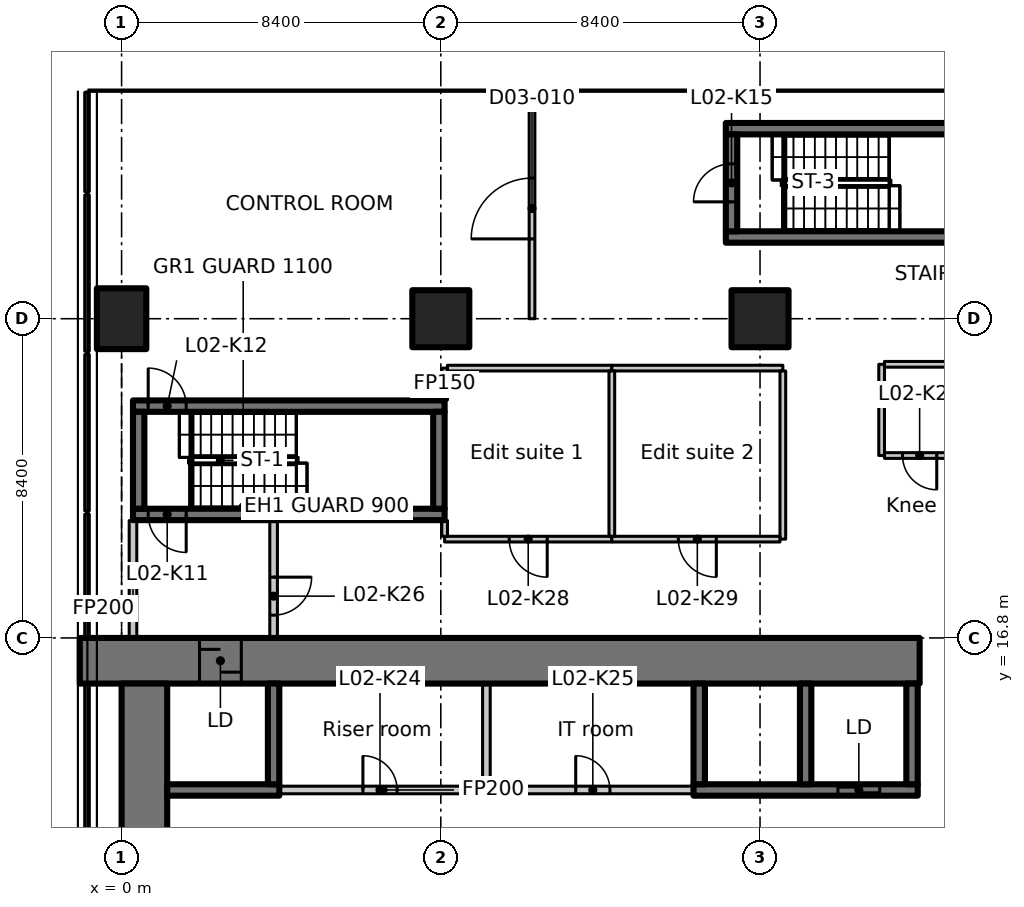
"""IFC4 building model, lengths in metres.
Left out: names, types, materials, properties, quantities, classifications, styles, units other than length and angle.
Written with IfcOpenShell. Run it as: python <this file> out.ifc"""

import sys

from ifc_helpers import new_model, si_unit, direction, frame, frame_2d, origin, origin_2d, place, context, subcontext, project, spatial, polyline, rectangle, outline, extrude, element, fill, save


model = new_model("IFC4")
c1 = context("Model", 3, precision=1e-05, world=origin(), true_north=direction((0.0, 1.0)))
c2 = subcontext(c1, "Body", "Model", "MODEL_VIEW")
j1 = project(units=[si_unit("LENGTHUNIT", "METRE"), si_unit("PLANEANGLEUNIT", "RADIAN")], contexts=[c1])
p1 = place(None, origin())
s1 = spatial("IfcSite", under=j1, at=p1, CompositionType="ELEMENT")
p2 = place(p1, origin())
s2 = spatial("IfcBuilding", under=s1, at=p2, CompositionType="ELEMENT")
p3 = place(p2, frame((0.0, 0.0, 12.5)))
s3 = spatial("IfcBuildingStorey", under=s2, at=p3, CompositionType="ELEMENT", Elevation=12.5)
p4 = place(p3, frame((0.0, 25.2, 0.0), z_axis=(0.0, 0.0, 1.0), x_axis=(1.0, 0.0, 0.0)))
e1 = element("IfcColumn", 1, at=p4, inside=s3, PredefinedType="COLUMN", context=c2, shape_type="SweptSolid", body=[
    extrude(rectangle(XDim=1.3, YDim=1.6, at=origin_2d()), origin(), (0.0, 0.0, 1.0), 7.25),
])
for number, where, z_axis, x_axis in (
    (2, (8.4, 25.2, 0.0), (0.0, 0.0, 1.0), (1.0, 0.0, 0.0)),
    (3, (16.8, 25.2, 0.0), (0.0, 0.0, 1.0), (1.0, 0.0, 0.0)),
):
    element("IfcColumn", number, at=place(p3, frame(where, z_axis=z_axis, x_axis=x_axis)), inside=s3, PredefinedType="COLUMN", context=c2, shape_type="SweptSolid", body=[
        extrude(rectangle(XDim=1.5, YDim=1.5, at=origin_2d()), origin(), (0.0, 0.0, 1.0), 7.25),
    ])
p5 = place(p2, origin())
s4 = spatial("IfcBuildingStorey", under=s2, at=p5, CompositionType="ELEMENT", Elevation=0.0)
for number, where, z_axis, x_axis in (
    (4, (0.6, 32.4, -6.3), (0.0, 0.0, 1.0), (1.0, 0.0, 0.0)),
    (5, (9.0, 32.4, -6.3), (0.0, 0.0, 1.0), (1.0, 0.0, 0.0)),
):
    element("IfcWall", number, at=place(p5, frame(where, z_axis=z_axis, x_axis=x_axis)), inside=s4, PredefinedType="SOLIDWALL", context=c2, shape_type="SweptSolid", body=[
        extrude(rectangle(XDim=7.2, YDim=2.4, at=frame_2d((3.6, 0.0))), origin(), (0.0, 0.0, 1.0), 42.55),
    ])
p6 = place(p5, frame((17.4, 32.4, -6.3), z_axis=(0.0, 0.0, 1.0), x_axis=(1.0, 0.0, 0.0)))
e6 = element("IfcWall", 6, at=p6, inside=s4, PredefinedType="SOLIDWALL", context=c2, shape_type="SweptSolid", body=[
    extrude(rectangle(XDim=7.2, YDim=2.4, at=frame_2d((3.6, 0.0))), origin(), (0.0, 0.0, 1.0), 42.55),
])
p7 = place(p3, origin())
e7 = element("IfcWall", 7, at=p7, inside=s3, PredefinedType="SOLIDWALL", context=c2, shape_type="SweptSolid", body=[
    extrude(outline(polyline([(-0.97, 28.545), (-0.85, 28.545), (-0.85, 31.155), (-0.97, 31.155), (-0.97, 28.545)])), origin(), (0.0, 0.0, 1.0), 7.5),
])
p8 = place(p3, origin())
e8 = element("IfcWall", 8, at=p8, inside=s3, PredefinedType="SOLIDWALL", context=c2, shape_type="SweptSolid", body=[
    extrude(outline(polyline([(-0.97, 24.345), (-0.85, 24.345), (-0.85, 28.455), (-0.97, 28.455), (-0.97, 24.345)])), origin(), (0.0, 0.0, 1.0), 7.5),
])
p9 = place(p3, origin())
e9 = element("IfcWall", 9, at=p9, inside=s3, PredefinedType="SOLIDWALL", context=c2, shape_type="SweptSolid", body=[
    extrude(outline(polyline([(-0.97, 20.145), (-0.85, 20.145), (-0.85, 24.255), (-0.97, 24.255), (-0.97, 20.145)])), origin(), (0.0, 0.0, 1.0), 7.5),
])
p10 = place(p3, origin())
e10 = element("IfcWall", 10, at=p10, inside=s3, PredefinedType="SOLIDWALL", context=c2, shape_type="SweptSolid", body=[
    extrude(outline(polyline([(-0.97, 15.945), (-0.85, 15.945), (-0.85, 20.055), (-0.97, 20.055), (-0.97, 15.945)])), origin(), (0.0, 0.0, 1.0), 7.5),
])
p11 = place(p3, origin())
e11 = element("IfcWall", 11, at=p11, inside=s3, PredefinedType="SOLIDWALL", context=c2, shape_type="SweptSolid", body=[
    extrude(outline(polyline([(-0.97, 11.745), (-0.85, 11.745), (-0.85, 15.855), (-0.97, 15.855), (-0.97, 11.745)])), origin(), (0.0, 0.0, 1.0), 7.5),
])
p12 = place(p3, frame((-1.1, 16.2, 0.0), z_axis=(0.0, 0.0, 1.0), x_axis=(1.0, 0.0, 0.0)))
e12 = element("IfcWall", 12, at=p12, inside=s3, PredefinedType="SHEAR", context=c2, shape_type="SweptSolid", body=[
    extrude(rectangle(XDim=22.1, YDim=1.2, at=frame_2d((11.05, 0.0))), origin(), (0.0, 0.0, 1.0), 7.25),
])
p13 = place(p12, frame((3.15, 0.0, 0.0)))
e13 = element("IfcOpeningElement", 13, at=p13, cuts=e12, PredefinedType="OPENING", context=c2, shape_type="SweptSolid", body=[
    extrude(rectangle(XDim=1.1, YDim=2.3, at=frame_2d((0.55, 1.15))), frame((0.0, 0.61, 0.0), z_axis=(0.0, -1.0, 0.0), x_axis=(1.0, 0.0, 0.0)), (0.0, 0.0, 1.0), 1.22),
])
p14 = place(p3, frame((0.6, 6.736, 0.0), z_axis=(0.0, 0.0, 1.0), x_axis=(0.0, 1.0, 0.0)))
e14 = element("IfcWall", 14, at=p14, inside=s3, PredefinedType="SHEAR", context=c2, shape_type="SweptSolid", body=[
    extrude(rectangle(XDim=8.864, YDim=1.2, at=frame_2d((4.432, 0.0))), origin(), (0.0, 0.0, 1.0), 7.25),
])
p15 = place(p3, frame((1.2, 12.8, 0.0), z_axis=(0.0, 0.0, 1.0), x_axis=(1.0, 0.0, 0.0)))
e15 = element("IfcWall", 15, at=p15, inside=s3, PredefinedType="SHEAR", context=c2, shape_type="SweptSolid", body=[
    extrude(rectangle(XDim=2.95, YDim=0.3, at=frame_2d((1.475, 0.0))), origin(), (0.0, 0.0, 1.0), 7.25),
])
p16 = place(p3, frame((4.0, 12.95, 0.0), z_axis=(0.0, 0.0, 1.0), x_axis=(0.0, 1.0, 0.0)))
e16 = element("IfcWall", 16, at=p16, inside=s3, PredefinedType="SHEAR", context=c2, shape_type="SweptSolid", body=[
    extrude(rectangle(XDim=2.65, YDim=0.3, at=frame_2d((1.325, 0.0))), origin(), (0.0, 0.0, 1.0), 7.25),
])
p17 = place(p3, frame((15.05, 12.8, 0.0), z_axis=(0.0, 0.0, 1.0), x_axis=(1.0, 0.0, 0.0)))
e17 = element("IfcWall", 17, at=p17, inside=s3, PredefinedType="SHEAR", context=c2, shape_type="SweptSolid", body=[
    extrude(rectangle(XDim=5.9, YDim=0.3, at=frame_2d((2.95, 0.0))), origin(), (0.0, 0.0, 1.0), 7.25),
])
p18 = place(p17, frame((3.8, 0.0, 0.0)))
e18 = element("IfcOpeningElement", 18, at=p18, cuts=e17, PredefinedType="OPENING", context=c2, shape_type="SweptSolid", body=[
    extrude(rectangle(XDim=1.1, YDim=2.3, at=frame_2d((0.55, 1.15))), frame((0.0, 0.16, 0.0), z_axis=(0.0, -1.0, 0.0), x_axis=(1.0, 0.0, 0.0)), (0.0, 0.0, 1.0), 0.32),
])
for number, where, z_axis, x_axis in (
    (19, (15.2, 12.95, 0.0), (0.0, 0.0, 1.0), (0.0, 1.0, 0.0)),
    (20, (18.0, 12.95, 0.0), (0.0, 0.0, 1.0), (0.0, 1.0, 0.0)),
    (21, (20.8, 12.95, 0.0), (0.0, 0.0, 1.0), (0.0, 1.0, 0.0)),
):
    element("IfcWall", number, at=place(p3, frame(where, z_axis=z_axis, x_axis=x_axis)), inside=s3, PredefinedType="SHEAR", context=c2, shape_type="SweptSolid", body=[
        extrude(rectangle(XDim=2.65, YDim=0.3, at=frame_2d((1.325, 0.0))), origin(), (0.0, 0.0, 1.0), 7.25),
    ])
p19 = place(p3, frame((8.5, 20.05, 0.0), z_axis=(0.0, 0.0, 1.0), x_axis=(-1.0, 0.0, 0.0)))
e22 = element("IfcWall", 22, at=p19, inside=s3, PredefinedType="SHEAR", context=c2, shape_type="SweptSolid", body=[
    extrude(rectangle(XDim=8.2, YDim=0.3, at=frame_2d((4.1, 0.0))), origin(), (0.0, 0.0, 1.0), 7.25),
])
p20 = place(p19, frame((6.8, 0.0, 0.0)))
e23 = element("IfcOpeningElement", 23, at=p20, cuts=e22, PredefinedType="OPENING", context=c2, shape_type="SweptSolid", body=[
    extrude(rectangle(XDim=1.0, YDim=2.1, at=frame_2d((0.5, 1.05))), frame((0.0, 0.16, 0.0), z_axis=(0.0, -1.0, 0.0), x_axis=(1.0, 0.0, 0.0)), (0.0, 0.0, 1.0), 0.32),
])
p21 = place(p3, frame((0.3, 22.9, 0.0), z_axis=(0.0, 0.0, 1.0), x_axis=(1.0, 0.0, 0.0)))
e24 = element("IfcWall", 24, at=p21, inside=s3, PredefinedType="SHEAR", context=c2, shape_type="SweptSolid", body=[
    extrude(rectangle(XDim=8.2, YDim=0.3, at=frame_2d((4.1, 0.0))), origin(), (0.0, 0.0, 1.0), 7.25),
])
p22 = place(p21, frame((0.4, 0.0, 0.0)))
e25 = element("IfcOpeningElement", 25, at=p22, cuts=e24, PredefinedType="OPENING", context=c2, shape_type="SweptSolid", body=[
    extrude(rectangle(XDim=1.0, YDim=2.1, at=frame_2d((0.5, 1.05))), frame((0.0, 0.16, 0.0), z_axis=(0.0, -1.0, 0.0), x_axis=(1.0, 0.0, 0.0)), (0.0, 0.0, 1.0), 0.32),
])
for number, where, z_axis, x_axis in (
    (26, (0.45, 20.2, 0.0), (0.0, 0.0, 1.0), (0.0, 1.0, 0.0)),
    (27, (8.35, 20.2, 0.0), (0.0, 0.0, 1.0), (0.0, 1.0, 0.0)),
):
    element("IfcWall", number, at=place(p3, frame(where, z_axis=z_axis, x_axis=x_axis)), inside=s3, PredefinedType="SHEAR", context=c2, shape_type="SweptSolid", body=[
        extrude(rectangle(XDim=2.55, YDim=0.3, at=frame_2d((1.275, 0.0))), origin(), (0.0, 0.0, 1.0), 7.25),
    ])
for number, where, z_axis, x_axis in (
    (28, (15.9, 27.35, 0.0), (0.0, 0.0, 1.0), (1.0, 0.0, 0.0)),
    (29, (15.9, 30.2, 0.0), (0.0, 0.0, 1.0), (1.0, 0.0, 0.0)),
):
    element("IfcWall", number, at=place(p3, frame(where, z_axis=z_axis, x_axis=x_axis)), inside=s3, PredefinedType="SHEAR", context=c2, shape_type="SweptSolid", body=[
        extrude(rectangle(XDim=8.2, YDim=0.3, at=frame_2d((4.1, 0.0))), origin(), (0.0, 0.0, 1.0), 7.25),
    ])
p23 = place(p3, frame((16.05, 27.5, 0.0), z_axis=(0.0, 0.0, 1.0), x_axis=(0.0, 1.0, 0.0)))
e30 = element("IfcWall", 30, at=p23, inside=s3, PredefinedType="SHEAR", context=c2, shape_type="SweptSolid", body=[
    extrude(rectangle(XDim=2.55, YDim=0.3, at=frame_2d((1.275, 0.0))), origin(), (0.0, 0.0, 1.0), 7.25),
])
p24 = place(p23, frame((0.775, 0.0, 0.0)))
e31 = element("IfcOpeningElement", 31, at=p24, cuts=e30, PredefinedType="OPENING", context=c2, shape_type="SweptSolid", body=[
    extrude(rectangle(XDim=1.0, YDim=2.1, at=frame_2d((0.5, 1.05))), frame((0.0, 0.16, 0.0), z_axis=(0.0, -1.0, 0.0), x_axis=(1.0, 0.0, 0.0)), (0.0, 0.0, 1.0), 0.32),
])
p25 = place(p3, frame((0.3, 16.812, 0.0), z_axis=(0.0, 0.0, 1.0), x_axis=(0.0, 1.0, 0.0)))
e32 = element("IfcWall", 32, at=p25, inside=s3, PredefinedType="PARTITIONING", context=c2, shape_type="SweptSolid", body=[
    extrude(rectangle(XDim=3.076, YDim=0.2, at=frame_2d((1.538, 0.0))), origin(), (0.0, 0.0, 1.0), 6.88),
])
p26 = place(p3, frame((4.0, 19.888, 0.0), z_axis=(0.0, 0.0, 1.0), x_axis=(0.0, -1.0, 0.0)))
e33 = element("IfcWall", 33, at=p26, inside=s3, PredefinedType="PARTITIONING", context=c2, shape_type="SweptSolid", body=[
    extrude(rectangle(XDim=3.076, YDim=0.2, at=frame_2d((1.538, 0.0))), origin(), (0.0, 0.0, 1.0), 7.25),
])
p27 = place(p26, frame((1.488, 0.0, 0.0)))
e34 = element("IfcOpeningElement", 34, at=p27, cuts=e33, PredefinedType="OPENING", context=c2, shape_type="SweptSolid", body=[
    extrude(rectangle(XDim=1.0, YDim=2.1, at=frame_2d((0.5, 1.05))), frame((0.0, 0.11, 0.0), z_axis=(0.0, -1.0, 0.0), x_axis=(1.0, 0.0, 0.0)), (0.0, 0.0, 1.0), 0.22),
])
p28 = place(p3, frame((4.162, 12.8, 0.0), z_axis=(0.0, 0.0, 1.0), x_axis=(1.0, 0.0, 0.0)))
e35 = element("IfcWall", 35, at=p28, inside=s3, PredefinedType="PARTITIONING", context=c2, shape_type="SweptSolid", body=[
    extrude(rectangle(XDim=5.438, YDim=0.2, at=frame_2d((2.719, 0.0))), origin(), (0.0, 0.0, 1.0), 7.25),
])
p29 = place(p28, frame((2.188, 0.0, 0.0)))
e36 = element("IfcOpeningElement", 36, at=p29, cuts=e35, PredefinedType="OPENING", context=c2, shape_type="SweptSolid", body=[
    extrude(rectangle(XDim=0.9, YDim=2.1, at=frame_2d((0.45, 1.05))), frame((0.0, 0.11, 0.0), z_axis=(0.0, -1.0, 0.0), x_axis=(1.0, 0.0, 0.0)), (0.0, 0.0, 1.0), 0.22),
])
p30 = place(p3, frame((9.6, 12.8, 0.0), z_axis=(0.0, 0.0, 1.0), x_axis=(1.0, 0.0, 0.0)))
e37 = element("IfcWall", 37, at=p30, inside=s3, PredefinedType="PARTITIONING", context=c2, shape_type="SweptSolid", body=[
    extrude(rectangle(XDim=5.438, YDim=0.2, at=frame_2d((2.719, 0.0))), origin(), (0.0, 0.0, 1.0), 7.25),
])
p31 = place(p30, frame((2.35, 0.0, 0.0)))
e38 = element("IfcOpeningElement", 38, at=p31, cuts=e37, PredefinedType="OPENING", context=c2, shape_type="SweptSolid", body=[
    extrude(rectangle(XDim=0.9, YDim=2.1, at=frame_2d((0.45, 1.05))), frame((0.0, 0.11, 0.0), z_axis=(0.0, -1.0, 0.0), x_axis=(1.0, 0.0, 0.0)), (0.0, 0.0, 1.0), 0.22),
])
p32 = place(p3, frame((9.6, 15.588, 0.0), z_axis=(0.0, 0.0, 1.0), x_axis=(0.0, -1.0, 0.0)))
e39 = element("IfcWall", 39, at=p32, inside=s3, PredefinedType="PARTITIONING", context=c2, shape_type="SweptSolid", body=[
    extrude(rectangle(XDim=2.688, YDim=0.2, at=frame_2d((1.344, 0.0))), origin(), (0.0, 0.0, 1.0), 7.25),
])
p33 = place(p3, frame((12.9, 19.4, 0.0), z_axis=(0.0, 0.0, 1.0), x_axis=(-1.0, 0.0, 0.0)))
e40 = element("IfcWall", 40, at=p33, inside=s3, PredefinedType="PARTITIONING", context=c2, shape_type="SweptSolid", body=[
    extrude(rectangle(XDim=4.4, YDim=0.15, at=frame_2d((2.2, 0.0))), origin(), (0.0, 0.0, 1.0), 7.25),
])
p34 = place(p33, frame((1.7, 0.0, 0.0)))
e41 = element("IfcOpeningElement", 41, at=p34, cuts=e40, PredefinedType="OPENING", context=c2, shape_type="SweptSolid", body=[
    extrude(rectangle(XDim=1.0, YDim=2.1, at=frame_2d((0.5, 1.05))), frame((0.0, 0.085, 0.0), z_axis=(0.0, -1.0, 0.0), x_axis=(1.0, 0.0, 0.0)), (0.0, 0.0, 1.0), 0.17),
])
p35 = place(p3, frame((8.5, 19.475, 0.0), z_axis=(0.0, 0.0, 1.0), x_axis=(0.0, 1.0, 0.0)))
e42 = element("IfcWall", 42, at=p35, inside=s3, PredefinedType="PARTITIONING", context=c2, shape_type="SweptSolid", body=[
    extrude(rectangle(XDim=0.413, YDim=0.15, at=frame_2d((0.207, 0.0))), origin(), (0.0, 0.0, 1.0), 7.25),
])
p36 = place(p3, frame((8.5, 23.062, 0.0), z_axis=(0.0, 0.0, 1.0), x_axis=(0.0, 1.0, 0.0)))
e43 = element("IfcWall", 43, at=p36, inside=s3, PredefinedType="PARTITIONING", context=c2, shape_type="SweptSolid", body=[
    extrude(rectangle(XDim=0.838, YDim=0.15, at=frame_2d((0.419, 0.0))), origin(), (0.0, 0.0, 1.0), 7.25),
])
p37 = place(p3, frame((8.575, 23.9, 0.0), z_axis=(0.0, 0.0, 1.0), x_axis=(1.0, 0.0, 0.0)))
e44 = element("IfcWall", 44, at=p37, inside=s3, PredefinedType="PARTITIONING", context=c2, shape_type="SweptSolid", body=[
    extrude(rectangle(XDim=4.325, YDim=0.15, at=frame_2d((2.163, 0.0))), origin(), (0.0, 0.0, 1.0), 7.25),
])
p38 = place(p3, frame((12.9, 23.9, 0.0), z_axis=(0.0, 0.0, 1.0), x_axis=(1.0, 0.0, 0.0)))
e45 = element("IfcWall", 45, at=p38, inside=s3, PredefinedType="PARTITIONING", context=c2, shape_type="SweptSolid", body=[
    extrude(rectangle(XDim=4.5, YDim=0.15, at=frame_2d((2.25, 0.0))), origin(), (0.0, 0.0, 1.0), 7.25),
])
p39 = place(p3, frame((17.4, 23.825, 0.0), z_axis=(0.0, 0.0, 1.0), x_axis=(0.0, -1.0, 0.0)))
e46 = element("IfcWall", 46, at=p39, inside=s3, PredefinedType="PARTITIONING", context=c2, shape_type="SweptSolid", body=[
    extrude(rectangle(XDim=4.425, YDim=0.15, at=frame_2d((2.212, 0.0))), origin(), (0.0, 0.0, 1.0), 7.25),
])
p40 = place(p3, frame((17.325, 19.4, 0.0), z_axis=(0.0, 0.0, 1.0), x_axis=(-1.0, 0.0, 0.0)))
e47 = element("IfcWall", 47, at=p40, inside=s3, PredefinedType="PARTITIONING", context=c2, shape_type="SweptSolid", body=[
    extrude(rectangle(XDim=4.425, YDim=0.15, at=frame_2d((2.212, 0.0))), origin(), (0.0, 0.0, 1.0), 7.25),
])
p41 = place(p40, frame((1.675, 0.0, 0.0)))
e48 = element("IfcOpeningElement", 48, at=p41, cuts=e47, PredefinedType="OPENING", context=c2, shape_type="SweptSolid", body=[
    extrude(rectangle(XDim=1.0, YDim=2.1, at=frame_2d((0.5, 1.05))), frame((0.0, 0.085, 0.0), z_axis=(0.0, -1.0, 0.0), x_axis=(1.0, 0.0, 0.0)), (0.0, 0.0, 1.0), 0.17),
])
p42 = place(p3, frame((12.9, 23.825, 0.0), z_axis=(0.0, 0.0, 1.0), x_axis=(0.0, -1.0, 0.0)))
e49 = element("IfcWall", 49, at=p42, inside=s3, PredefinedType="PARTITIONING", context=c2, shape_type="SweptSolid", body=[
    extrude(rectangle(XDim=4.35, YDim=0.15, at=frame_2d((2.175, 0.0))), origin(), (0.0, 0.0, 1.0), 7.25),
])
p43 = place(p3, frame((20.0, 21.6, 0.0), z_axis=(0.0, 0.0, 1.0), x_axis=(0.0, 1.0, 0.0)))
e50 = element("IfcWall", 50, at=p43, inside=s3, PredefinedType="PARTITIONING", context=c2, shape_type="SweptSolid", body=[
    extrude(rectangle(XDim=2.4, YDim=0.15, at=frame_2d((1.2, 0.0))), origin(), (0.0, 0.0, 1.0), 7.25),
])
p44 = place(p3, frame((20.075, 24.0, 0.0), z_axis=(0.0, 0.0, 1.0), x_axis=(1.0, 0.0, 0.0)))
e51 = element("IfcWall", 51, at=p44, inside=s3, PredefinedType="PARTITIONING", context=c2, shape_type="SweptSolid", body=[
    extrude(rectangle(XDim=1.925, YDim=0.15, at=frame_2d((0.962, 0.0))), origin(), (0.0, 0.0, 1.0), 7.25),
])
p45 = place(p3, frame((21.925, 21.6, 0.0), z_axis=(0.0, 0.0, 1.0), x_axis=(-1.0, 0.0, 0.0)))
e52 = element("IfcWall", 52, at=p45, inside=s3, PredefinedType="PARTITIONING", context=c2, shape_type="SweptSolid", body=[
    extrude(rectangle(XDim=1.85, YDim=0.15, at=frame_2d((0.925, 0.0))), origin(), (0.0, 0.0, 1.0), 7.25),
])
p46 = place(p45, frame((0.475, 0.0, 0.0)))
e53 = element("IfcOpeningElement", 53, at=p46, cuts=e52, PredefinedType="OPENING", context=c2, shape_type="SweptSolid", body=[
    extrude(rectangle(XDim=0.9, YDim=2.1, at=frame_2d((0.45, 1.05))), frame((0.0, 0.085, 0.0), z_axis=(0.0, -1.0, 0.0), x_axis=(1.0, 0.0, 0.0)), (0.0, 0.0, 1.0), 0.17),
])
p47 = place(p3, frame((10.8, 25.2, 0.0), z_axis=(0.0, 0.0, 1.0), x_axis=(0.0, 1.0, 0.0)))
e54 = element("IfcWall", 54, at=p47, inside=s3, PredefinedType="PARTITIONING", context=c2, shape_type="SweptSolid", body=[
    extrude(rectangle(XDim=6.0, YDim=0.15, at=frame_2d((3.0, 0.0))), origin(), (0.0, 0.0, 1.0), 7.23),
])
p48 = place(p47, frame((2.1, 0.0, 0.0)))
e55 = element("IfcOpeningElement", 55, at=p48, cuts=e54, PredefinedType="OPENING", context=c2, shape_type="SweptSolid", body=[
    extrude(rectangle(XDim=1.6, YDim=2.1, at=frame_2d((0.8, 1.05))), frame((0.0, 0.085, 0.0), z_axis=(0.0, -1.0, 0.0), x_axis=(1.0, 0.0, 0.0)), (0.0, 0.0, 1.0), 0.17),
])
p49 = place(p13, origin())
e56 = element("IfcDoor", 56, at=p49, inside=s3, OperationType="SLIDING_TO_LEFT", PredefinedType="DOOR", context=c2, shape_type="SweptSolid", body=[
    extrude(rectangle(XDim=1.1, YDim=2.3, at=frame_2d((0.55, 1.15))), frame((0.0, 0.025, 0.0), z_axis=(0.0, -1.0, 0.0), x_axis=(1.0, 0.0, 0.0)), (0.0, 0.0, 1.0), 0.05),
])
fill(e13, e56)
p50 = place(p18, origin())
e57 = element("IfcDoor", 57, at=p50, inside=s3, OperationType="SLIDING_TO_LEFT", PredefinedType="DOOR", context=c2, shape_type="SweptSolid", body=[
    extrude(rectangle(XDim=1.1, YDim=2.3, at=frame_2d((0.55, 1.15))), frame((0.0, 0.025, 0.0), z_axis=(0.0, -1.0, 0.0), x_axis=(1.0, 0.0, 0.0)), (0.0, 0.0, 1.0), 0.05),
])
fill(e18, e57)
p51 = place(p20, origin())
e58 = element("IfcDoor", 58, at=p51, inside=s3, OperationType="SINGLE_SWING_LEFT", PredefinedType="DOOR", context=c2, shape_type="SweptSolid", body=[
    extrude(rectangle(XDim=1.0, YDim=2.1, at=frame_2d((0.5, 1.05))), frame((0.0, 0.025, 0.0), z_axis=(0.0, -1.0, 0.0), x_axis=(1.0, 0.0, 0.0)), (0.0, 0.0, 1.0), 0.05),
])
fill(e23, e58)
p52 = place(p22, origin())
e59 = element("IfcDoor", 59, at=p52, inside=s3, OperationType="SINGLE_SWING_RIGHT", PredefinedType="DOOR", context=c2, shape_type="SweptSolid", body=[
    extrude(rectangle(XDim=1.0, YDim=2.1, at=frame_2d((0.5, 1.05))), frame((0.0, 0.025, 0.0), z_axis=(0.0, -1.0, 0.0), x_axis=(1.0, 0.0, 0.0)), (0.0, 0.0, 1.0), 0.05),
])
fill(e25, e59)
p53 = place(p24, origin())
e60 = element("IfcDoor", 60, at=p53, inside=s3, OperationType="SINGLE_SWING_LEFT", PredefinedType="DOOR", context=c2, shape_type="SweptSolid", body=[
    extrude(rectangle(XDim=1.0, YDim=2.1, at=frame_2d((0.5, 1.05))), frame((0.0, 0.025, 0.0), z_axis=(0.0, -1.0, 0.0), x_axis=(1.0, 0.0, 0.0)), (0.0, 0.0, 1.0), 0.05),
])
fill(e31, e60)
p54 = place(p29, origin())
e61 = element("IfcDoor", 61, at=p54, inside=s3, OperationType="SINGLE_SWING_RIGHT", PredefinedType="DOOR", context=c2, shape_type="SweptSolid", body=[
    extrude(rectangle(XDim=0.9, YDim=2.1, at=frame_2d((0.45, 1.05))), frame((0.0, 0.025, 0.0), z_axis=(0.0, -1.0, 0.0), x_axis=(1.0, 0.0, 0.0)), (0.0, 0.0, 1.0), 0.05),
])
fill(e36, e61)
p55 = place(p31, origin())
e62 = element("IfcDoor", 62, at=p55, inside=s3, OperationType="SINGLE_SWING_LEFT", PredefinedType="DOOR", context=c2, shape_type="SweptSolid", body=[
    extrude(rectangle(XDim=0.9, YDim=2.1, at=frame_2d((0.45, 1.05))), frame((0.0, 0.025, 0.0), z_axis=(0.0, -1.0, 0.0), x_axis=(1.0, 0.0, 0.0)), (0.0, 0.0, 1.0), 0.05),
])
fill(e38, e62)
p56 = place(p27, origin())
e63 = element("IfcDoor", 63, at=p56, inside=s3, OperationType="SINGLE_SWING_RIGHT", PredefinedType="DOOR", context=c2, shape_type="SweptSolid", body=[
    extrude(rectangle(XDim=1.0, YDim=2.1, at=frame_2d((0.5, 1.05))), frame((0.0, 0.025, 0.0), z_axis=(0.0, -1.0, 0.0), x_axis=(1.0, 0.0, 0.0)), (0.0, 0.0, 1.0), 0.05),
])
fill(e34, e63)
p57 = place(p46, origin())
e64 = element("IfcDoor", 64, at=p57, inside=s3, OperationType="SINGLE_SWING_LEFT", PredefinedType="DOOR", context=c2, shape_type="SweptSolid", body=[
    extrude(rectangle(XDim=0.9, YDim=2.1, at=frame_2d((0.45, 1.05))), frame((0.0, 0.025, 0.0), z_axis=(0.0, -1.0, 0.0), x_axis=(1.0, 0.0, 0.0)), (0.0, 0.0, 1.0), 0.05),
])
fill(e53, e64)
p58 = place(p34, origin())
e65 = element("IfcDoor", 65, at=p58, inside=s3, OperationType="SINGLE_SWING_RIGHT", PredefinedType="DOOR", context=c2, shape_type="SweptSolid", body=[
    extrude(rectangle(XDim=1.0, YDim=2.1, at=frame_2d((0.5, 1.05))), frame((0.0, 0.025, 0.0), z_axis=(0.0, -1.0, 0.0), x_axis=(1.0, 0.0, 0.0)), (0.0, 0.0, 1.0), 0.05),
])
fill(e41, e65)
p59 = place(p41, origin())
e66 = element("IfcDoor", 66, at=p59, inside=s3, OperationType="SINGLE_SWING_LEFT", PredefinedType="DOOR", context=c2, shape_type="SweptSolid", body=[
    extrude(rectangle(XDim=1.0, YDim=2.1, at=frame_2d((0.5, 1.05))), frame((0.0, 0.025, 0.0), z_axis=(0.0, -1.0, 0.0), x_axis=(1.0, 0.0, 0.0)), (0.0, 0.0, 1.0), 0.05),
])
fill(e48, e66)
p60 = place(p48, origin())
e67 = element("IfcDoor", 67, at=p60, inside=s3, OperationType="DOUBLE_DOOR_SINGLE_SWING", PredefinedType="DOOR", context=c2, shape_type="SweptSolid", body=[
    extrude(rectangle(XDim=1.6, YDim=2.1, at=frame_2d((0.8, 1.05))), frame((0.0, 0.025, 0.0), z_axis=(0.0, -1.0, 0.0), x_axis=(1.0, 0.0, 0.0)), (0.0, 0.0, 1.0), 0.05),
])
fill(e55, e67)
save(model, sys.argv[1])
